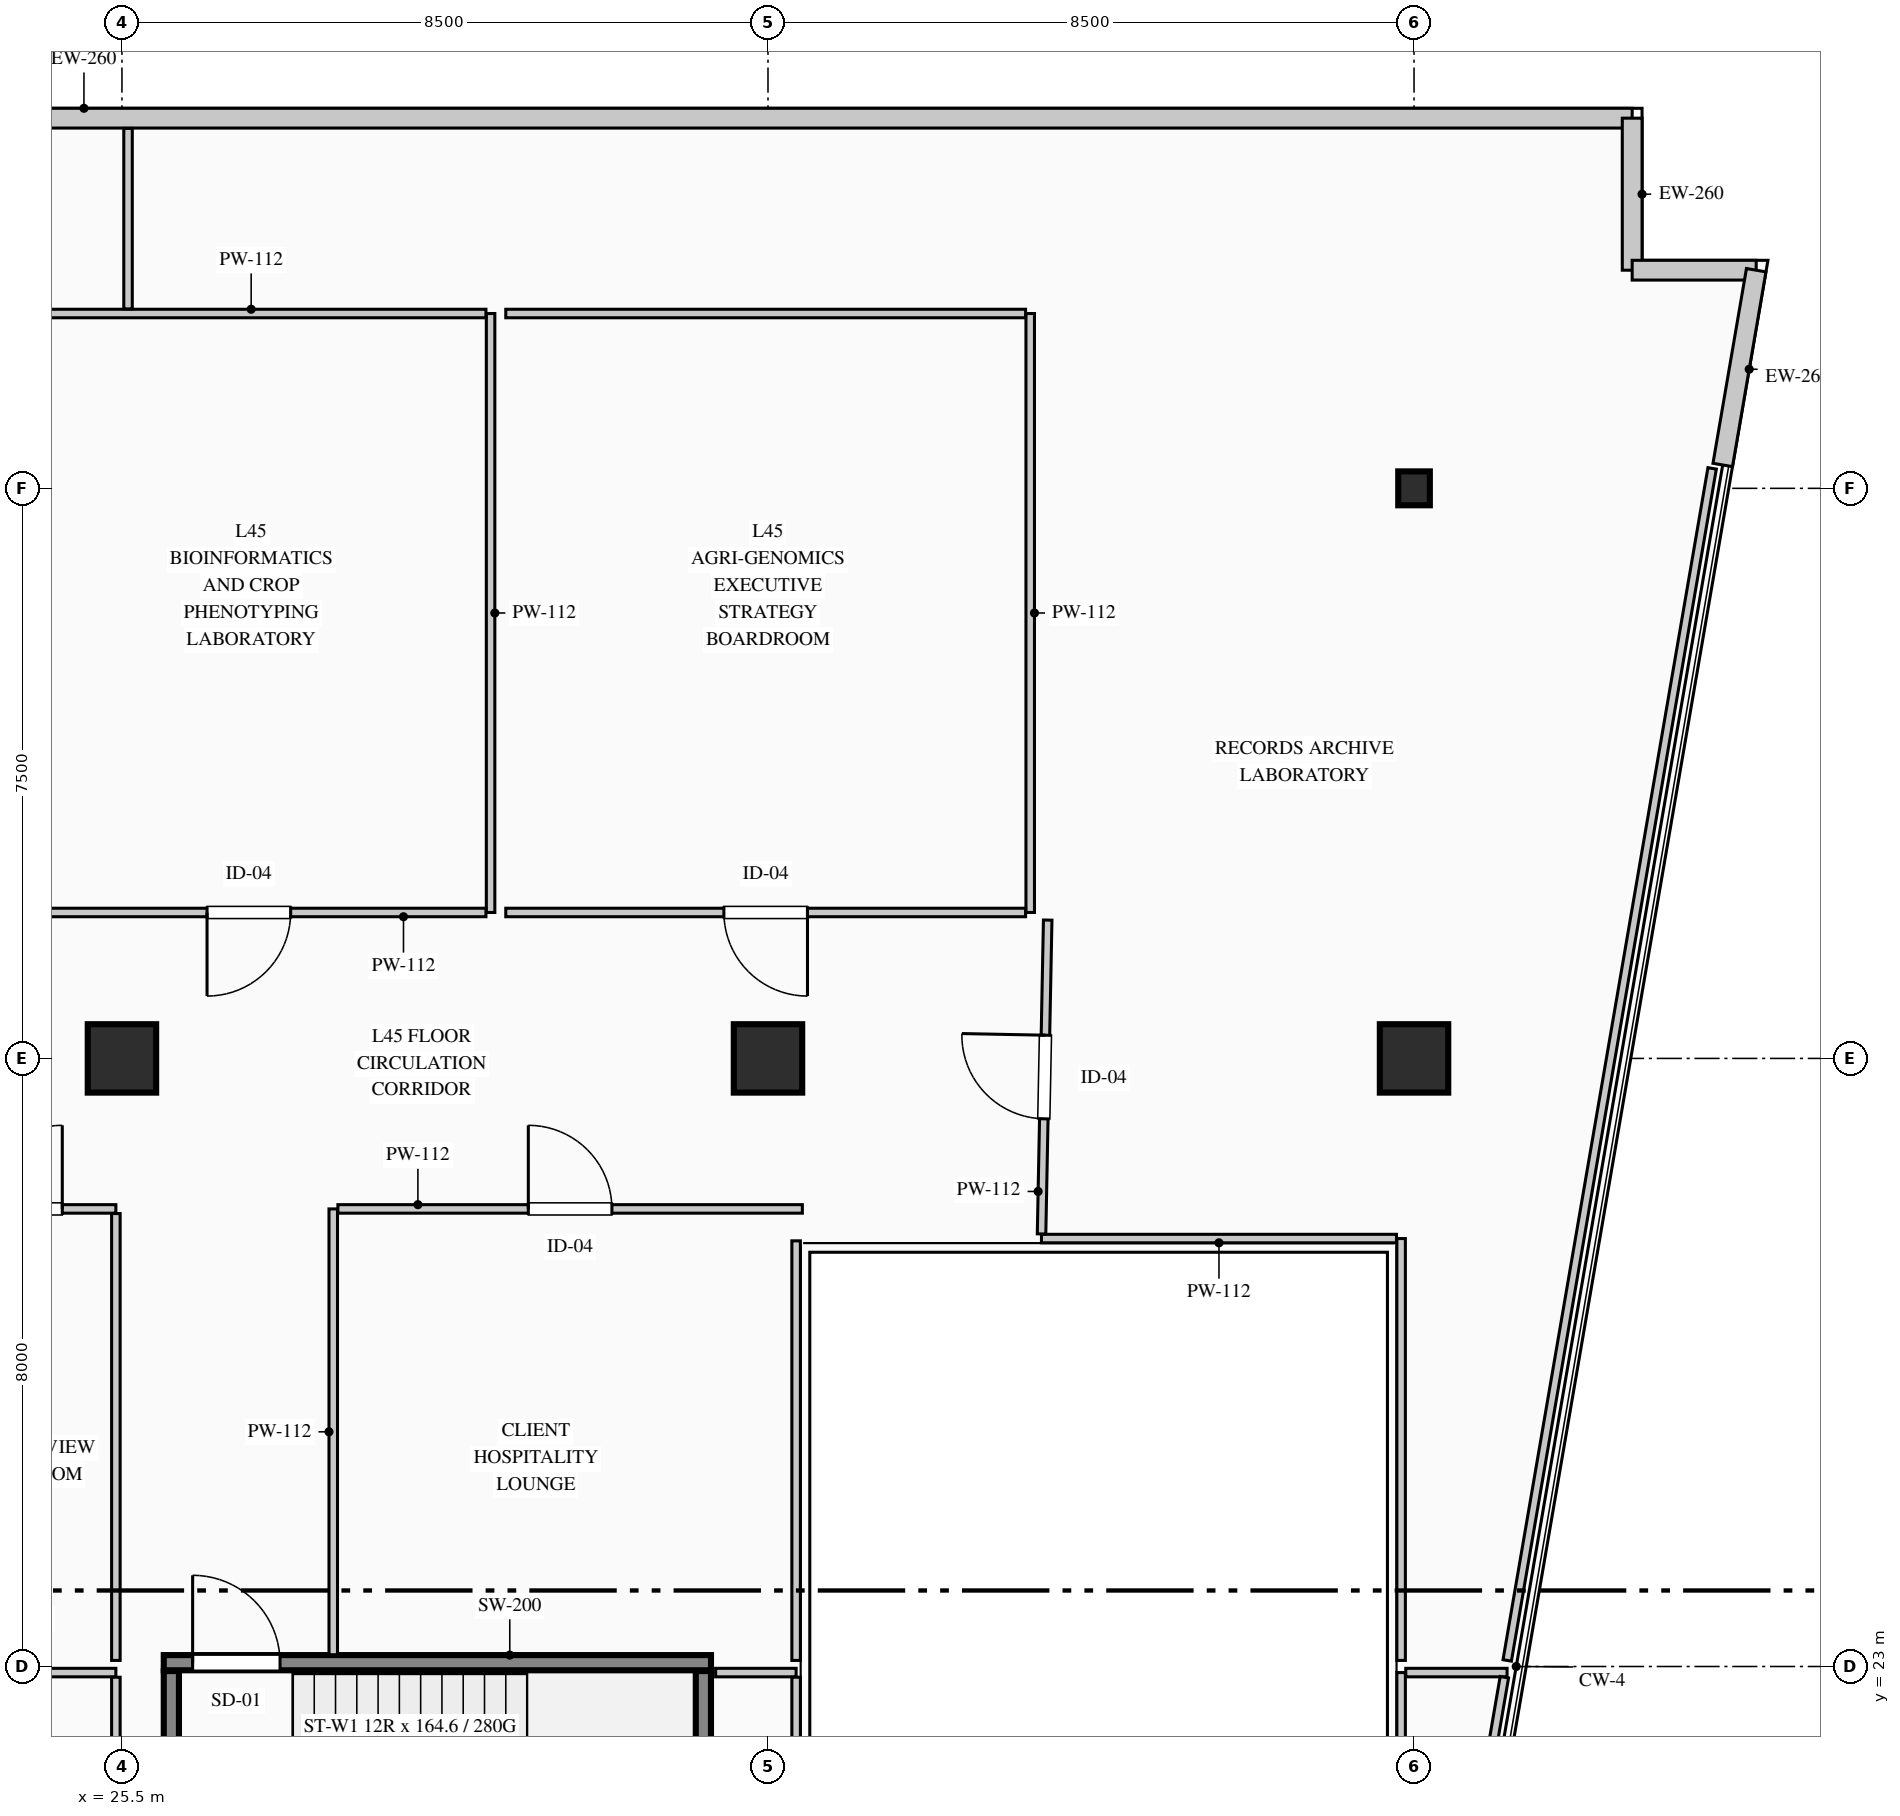
"""IFC4 building model, lengths in metres.
Left out: names, types, materials, properties, quantities, classifications, styles, units other than length and angle.
Written with IfcOpenShell. Run it as: python <this file> out.ifc"""

import sys

from ifc_helpers import new_model, si_unit, direction, frame, frame_2d, origin, origin_2d, place, context, subcontext, project, spatial, rectangle, i_section, extrude, element, fill, save


model = new_model("IFC4")
c1 = context("Model", 3, precision=1e-05, world=origin(), true_north=direction((0.0, 1.0)))
c2 = subcontext(c1, "Body", "Model", "MODEL_VIEW")
j1 = project(units=[si_unit("LENGTHUNIT", "METRE"), si_unit("PLANEANGLEUNIT", "RADIAN")], contexts=[c1])
p1 = place(None, origin())
s1 = spatial("IfcSite", under=j1, at=p1, CompositionType="ELEMENT")
p2 = place(p1, origin())
s2 = spatial("IfcBuilding", under=s1, at=p2, CompositionType="ELEMENT")
p3 = place(p2, frame((0.0, 0.0, 191.65)))
s3 = spatial("IfcBuildingStorey", under=s2, at=p3, CompositionType="ELEMENT", Elevation=191.65)
p4 = place(p3, frame((26.05, 23.05, 0.0), z_axis=(0.0, 0.0, 1.0), x_axis=(1.0, 0.0, 0.0)))
e1 = element("IfcWall", 1, at=p4, inside=s3, PredefinedType="SHEAR", context=c2, shape_type="SweptSolid", body=[
    extrude(rectangle(XDim=7.2, YDim=0.2, at=frame_2d((3.6, 0.0))), origin(), (0.0, 0.0, 1.0), 3.95),
])
p5 = place(p4, frame((0.38, 0.0, 0.0)))
e2 = element("IfcOpeningElement", 2, at=p5, cuts=e1, PredefinedType="OPENING", context=c2, shape_type="SweptSolid", body=[
    extrude(rectangle(XDim=1.15, YDim=2.2, at=frame_2d((0.575, 1.1))), frame((0.0, 0.11, 0.0), z_axis=(0.0, -1.0, 0.0), x_axis=(1.0, 0.0, 0.0)), (0.0, 0.0, 1.0), 0.22),
])
for number, where, z_axis, x_axis in (
    (3, (26.15, 19.81, 0.0), (0.0, 0.0, 1.0), (0.0, 1.0, 0.0)),
    (4, (33.15, 19.81, 0.0), (0.0, 0.0, 1.0), (0.0, 1.0, 0.0)),
):
    element("IfcWall", number, at=place(p3, frame(where, z_axis=z_axis, x_axis=x_axis)), inside=s3, PredefinedType="SHEAR", context=c2, shape_type="SweptSolid", body=[
        extrude(rectangle(XDim=3.13, YDim=0.2, at=frame_2d((1.565, 0.0))), origin(), (0.0, 0.0, 1.0), 3.95),
    ])
for number, where, z_axis, x_axis in (
    (5, (25.5, 31.0, 0.0), (0.0, 0.0, 1.0), (1.0, 0.0, 0.0)),
    (6, (34.0, 31.0, 0.0), (0.0, 0.0, 1.0), (1.0, 0.0, 0.0)),
    (7, (42.5, 31.0, 0.0), (0.0, 0.0, 1.0), (1.0, 0.0, 0.0)),
):
    element("IfcColumn", number, at=place(p3, frame(where, z_axis=z_axis, x_axis=x_axis)), inside=s3, PredefinedType="COLUMN", context=c2, shape_type="SweptSolid", body=[
        extrude(rectangle(XDim=0.9, YDim=0.9, at=origin_2d()), origin(), (0.0, 0.0, 1.0), 3.95),
    ])
p6 = place(p3, frame((42.5, 38.5, 0.0), z_axis=(0.0, 0.0, 1.0), x_axis=(1.0, 0.0, 0.0)))
e8 = element("IfcColumn", 8, at=p6, inside=s3, PredefinedType="COLUMN", context=c2, shape_type="SweptSolid", body=[
    extrude(i_section(OverallWidth=0.416, OverallDepth=0.446, WebThickness=0.039, FlangeThickness=0.063, FilletRadius=0.015, at=origin_2d()), origin(), (0.0, 0.0, 1.0), 3.95),
])
p7 = place(p3, frame((4.63, 43.37, 0.0), z_axis=(0.0, 0.0, 1.0), x_axis=(1.0, 0.0, 0.0)))
e9 = element("IfcWall", 9, at=p7, inside=s3, PredefinedType="STANDARD", context=c2, shape_type="SweptSolid", body=[
    extrude(rectangle(XDim=40.74, YDim=0.26, at=frame_2d((20.37, 0.0))), origin(), (0.0, 0.0, 1.0), 3.7),
])
p8 = place(p7, frame((13.316, 0.0, 0.9)))
e10 = element("IfcOpeningElement", 10, at=p8, cuts=e9, PredefinedType="OPENING", context=c2, shape_type="SweptSolid", body=[
    extrude(rectangle(XDim=2.7, YDim=2.1, at=frame_2d((1.35, 1.05))), frame((0.0, 0.14, 0.0), z_axis=(0.0, -1.0, 0.0), x_axis=(1.0, 0.0, 0.0)), (0.0, 0.0, 1.0), 0.28),
])
p9 = place(p3, frame((45.37, 43.37, 0.0), z_axis=(0.0, 0.0, 1.0), x_axis=(0.0, -1.0, 0.0)))
e11 = element("IfcWall", 11, at=p9, inside=s3, PredefinedType="STANDARD", context=c2, shape_type="SweptSolid", body=[
    extrude(rectangle(XDim=2.0, YDim=0.26, at=frame_2d((1.0, 0.0))), origin(), (0.0, 0.0, 1.0), 3.7),
])
p10 = place(p3, frame((45.37, 41.37, 0.0), z_axis=(0.0, 0.0, 1.0), x_axis=(1.0, 0.0, 0.0)))
e12 = element("IfcWall", 12, at=p10, inside=s3, PredefinedType="STANDARD", context=c2, shape_type="SweptSolid", body=[
    extrude(rectangle(XDim=1.632, YDim=0.26, at=frame_2d((0.816, 0.0))), origin(), (0.0, 0.0, 1.0), 3.7),
])
p11 = place(p3, frame((47.002, 41.37, 0.0), z_axis=(0.0, 0.0, 1.0), x_axis=(-0.169391215599, -0.98554889076, 0.0)))
e13 = element("IfcWall", 13, at=p11, inside=s3, PredefinedType="STANDARD", context=c2, shape_type="SweptSolid", body=[
    extrude(rectangle(XDim=2.6, YDim=0.26, at=frame_2d((1.3, 0.0))), origin(), (0.0, 0.0, 1.0), 3.7),
])
p12 = place(p3, frame((30.35, 40.8, 0.0), z_axis=(0.0, 0.0, 1.0), x_axis=(0.0, -1.0, 0.0)))
e14 = element("IfcWall", 14, at=p12, inside=s3, PredefinedType="PARTITIONING", context=c2, shape_type="SweptSolid", body=[
    extrude(rectangle(XDim=7.88, YDim=0.112, at=frame_2d((3.94, 0.0))), origin(), (0.0, 0.0, 1.0), 3.7),
])
p13 = place(p3, frame((30.289, 32.92, 0.0), z_axis=(0.0, 0.0, 1.0), x_axis=(-1.0, 0.0, 0.0)))
e15 = element("IfcWall", 15, at=p13, inside=s3, PredefinedType="PARTITIONING", context=c2, shape_type="SweptSolid", body=[
    extrude(rectangle(XDim=6.239, YDim=0.112, at=frame_2d((3.12, 0.0))), origin(), (0.0, 0.0, 1.0), 3.7),
])
p14 = place(p13, frame((2.57, 0.0, 0.0)))
e16 = element("IfcOpeningElement", 16, at=p14, cuts=e15, PredefinedType="OPENING", context=c2, shape_type="SweptSolid", body=[
    extrude(rectangle(XDim=1.1, YDim=2.2, at=frame_2d((0.55, 1.1))), frame((0.0, 0.066, 0.0), z_axis=(0.0, -1.0, 0.0), x_axis=(1.0, 0.0, 0.0)), (0.0, 0.0, 1.0), 0.132),
])
p15 = place(p3, frame((24.111, 40.8, 0.0), z_axis=(0.0, 0.0, 1.0), x_axis=(1.0, 0.0, 0.0)))
e17 = element("IfcWall", 17, at=p15, inside=s3, PredefinedType="PARTITIONING", context=c2, shape_type="SweptSolid", body=[
    extrude(rectangle(XDim=6.178, YDim=0.112, at=frame_2d((3.089, 0.0))), origin(), (0.0, 0.0, 1.0), 3.7),
])
p16 = place(p3, frame((37.45, 40.8, 0.0), z_axis=(0.0, 0.0, 1.0), x_axis=(0.0, -1.0, 0.0)))
e18 = element("IfcWall", 18, at=p16, inside=s3, PredefinedType="PARTITIONING", context=c2, shape_type="SweptSolid", body=[
    extrude(rectangle(XDim=7.88, YDim=0.112, at=frame_2d((3.94, 0.0))), origin(), (0.0, 0.0, 1.0), 3.7),
])
p17 = place(p3, frame((37.389, 32.92, 0.0), z_axis=(0.0, 0.0, 1.0), x_axis=(-1.0, 0.0, 0.0)))
e19 = element("IfcWall", 19, at=p17, inside=s3, PredefinedType="PARTITIONING", context=c2, shape_type="SweptSolid", body=[
    extrude(rectangle(XDim=6.839, YDim=0.112, at=frame_2d((3.419, 0.0))), origin(), (0.0, 0.0, 1.0), 3.7),
])
p18 = place(p17, frame((2.869, 0.0, 0.0)))
e20 = element("IfcOpeningElement", 20, at=p18, cuts=e19, PredefinedType="OPENING", context=c2, shape_type="SweptSolid", body=[
    extrude(rectangle(XDim=1.1, YDim=2.2, at=frame_2d((0.55, 1.1))), frame((0.0, 0.066, 0.0), z_axis=(0.0, -1.0, 0.0), x_axis=(1.0, 0.0, 0.0)), (0.0, 0.0, 1.0), 0.132),
])
p19 = place(p3, frame((30.55, 40.8, 0.0), z_axis=(0.0, 0.0, 1.0), x_axis=(1.0, 0.0, 0.0)))
e21 = element("IfcWall", 21, at=p19, inside=s3, PredefinedType="PARTITIONING", context=c2, shape_type="SweptSolid", body=[
    extrude(rectangle(XDim=6.839, YDim=0.112, at=frame_2d((3.419, 0.0))), origin(), (0.0, 0.0, 1.0), 3.7),
])
p20 = place(p3, frame((33.311, 22.92, 0.0), z_axis=(0.0, 0.0, 1.0), x_axis=(1.0, 0.0, 0.0)))
e22 = element("IfcWall", 22, at=p20, inside=s3, PredefinedType="PARTITIONING", context=c2, shape_type="SweptSolid", body=[
    extrude(rectangle(XDim=1.059, YDim=0.112, at=frame_2d((0.53, 0.0))), origin(), (0.0, 0.0, 1.0), 3.7),
])
p21 = place(p3, frame((34.37, 22.859, 0.0), z_axis=(0.0, 0.0, 1.0), x_axis=(0.0, -1.0, 0.0)))
e23 = element("IfcWall", 23, at=p21, inside=s3, PredefinedType="PARTITIONING", context=c2, shape_type="SweptSolid", body=[
    extrude(rectangle(XDim=3.239, YDim=0.112, at=frame_2d((1.619, 0.0))), origin(), (0.0, 0.0, 1.0), 3.7),
])
p22 = place(p3, frame((42.33, 19.681, 0.0), z_axis=(0.0, 0.0, 1.0), x_axis=(0.0, 1.0, 0.0)))
e24 = element("IfcWall", 24, at=p22, inside=s3, PredefinedType="PARTITIONING", context=c2, shape_type="SweptSolid", body=[
    extrude(rectangle(XDim=3.239, YDim=0.112, at=frame_2d((1.62, 0.0))), origin(), (0.0, 0.0, 1.0), 3.7),
])
p23 = place(p3, frame((42.391, 22.92, 0.0), z_axis=(0.0, 0.0, 1.0), x_axis=(1.0, 0.0, 0.0)))
e25 = element("IfcWall", 25, at=p23, inside=s3, PredefinedType="PARTITIONING", context=c2, shape_type="SweptSolid", body=[
    extrude(rectangle(XDim=1.333, YDim=0.112, at=frame_2d((0.667, 0.0))), origin(), (0.0, 0.0, 1.0), 3.7),
])
p24 = place(p3, frame((43.688, 22.859, 0.0), z_axis=(0.0, 0.0, 1.0), x_axis=(-0.169369383288, -0.985552642939, 0.0)))
e26 = element("IfcWall", 26, at=p24, inside=s3, PredefinedType="PARTITIONING", context=c2, shape_type="SweptSolid", body=[
    extrude(rectangle(XDim=3.225, YDim=0.112, at=frame_2d((1.612, 0.0))), origin(), (0.0, 0.0, 1.0), 3.7),
])
p25 = place(p3, frame((22.91, 22.92, 0.0), z_axis=(0.0, 0.0, 1.0), x_axis=(1.0, 0.0, 0.0)))
e27 = element("IfcWall", 27, at=p25, inside=s3, PredefinedType="PARTITIONING", context=c2, shape_type="SweptSolid", body=[
    extrude(rectangle(XDim=2.51, YDim=0.112, at=frame_2d((1.255, 0.0))), origin(), (0.0, 0.0, 1.0), 3.7),
])
p26 = place(p3, frame((25.42, 22.859, 0.0), z_axis=(0.0, 0.0, 1.0), x_axis=(0.0, -1.0, 0.0)))
e28 = element("IfcWall", 28, at=p26, inside=s3, PredefinedType="PARTITIONING", context=c2, shape_type="SweptSolid", body=[
    extrude(rectangle(XDim=7.611, YDim=0.112, at=frame_2d((3.805, 0.0))), origin(), (0.0, 0.0, 1.0), 2.885),
])
p27 = place(p3, frame((22.91, 29.02, 0.0), z_axis=(0.0, 0.0, 1.0), x_axis=(1.0, 0.0, 0.0)))
e29 = element("IfcWall", 29, at=p27, inside=s3, PredefinedType="PARTITIONING", context=c2, shape_type="SweptSolid", body=[
    extrude(rectangle(XDim=2.51, YDim=0.112, at=frame_2d((1.255, 0.0))), origin(), (0.0, 0.0, 1.0), 3.7),
])
p28 = place(p27, frame((0.705, 0.0, 0.0)))
e30 = element("IfcOpeningElement", 30, at=p28, cuts=e29, PredefinedType="OPENING", context=c2, shape_type="SweptSolid", body=[
    extrude(rectangle(XDim=1.1, YDim=2.2, at=frame_2d((0.55, 1.1))), frame((0.0, 0.066, 0.0), z_axis=(0.0, -1.0, 0.0), x_axis=(1.0, 0.0, 0.0)), (0.0, 0.0, 1.0), 0.132),
])
p29 = place(p3, frame((25.42, 28.959, 0.0), z_axis=(0.0, 0.0, 1.0), x_axis=(0.0, -1.0, 0.0)))
e31 = element("IfcWall", 31, at=p29, inside=s3, PredefinedType="PARTITIONING", context=c2, shape_type="SweptSolid", body=[
    extrude(rectangle(XDim=5.879, YDim=0.112, at=frame_2d((2.939, 0.0))), origin(), (0.0, 0.0, 1.0), 2.885),
])
p30 = place(p3, frame((34.37, 28.6, 0.0), z_axis=(0.0, 0.0, 1.0), x_axis=(0.0, -1.0, 0.0)))
e32 = element("IfcWall", 32, at=p30, inside=s3, PredefinedType="PARTITIONING", context=c2, shape_type="SweptSolid", body=[
    extrude(rectangle(XDim=5.52, YDim=0.112, at=frame_2d((2.76, 0.0))), origin(), (0.0, 0.0, 1.0), 3.7),
])
p31 = place(p3, frame((28.28, 23.155, 0.0), z_axis=(0.0, 0.0, 1.0), x_axis=(0.0, 1.0, 0.0)))
e33 = element("IfcWall", 33, at=p31, inside=s3, PredefinedType="PARTITIONING", context=c2, shape_type="SweptSolid", body=[
    extrude(rectangle(XDim=5.865, YDim=0.112, at=frame_2d((2.933, 0.0))), origin(), (0.0, 0.0, 1.0), 3.7),
])
p32 = place(p3, frame((28.341, 29.02, 0.0), z_axis=(0.0, 0.0, 1.0), x_axis=(1.0, 0.0, 0.0)))
e34 = element("IfcWall", 34, at=p32, inside=s3, PredefinedType="PARTITIONING", context=c2, shape_type="SweptSolid", body=[
    extrude(rectangle(XDim=6.111, YDim=0.112, at=frame_2d((3.055, 0.0))), origin(), (0.0, 0.0, 1.0), 3.385),
])
p33 = place(p32, frame((2.506, 0.0, 0.0)))
e35 = element("IfcOpeningElement", 35, at=p33, cuts=e34, PredefinedType="OPENING", context=c2, shape_type="SweptSolid", body=[
    extrude(rectangle(XDim=1.1, YDim=2.2, at=frame_2d((0.55, 1.1))), frame((0.0, 0.066, 0.0), z_axis=(0.0, -1.0, 0.0), x_axis=(1.0, 0.0, 0.0)), (0.0, 0.0, 1.0), 0.132),
])
p34 = place(p3, frame((46.422, 38.763, 0.0), z_axis=(0.0, 0.0, 1.0), x_axis=(-0.169427539839, -0.985542646842, 0.0)))
e36 = element("IfcWall", 36, at=p34, inside=s3, PredefinedType="PARTITIONING", context=c2, shape_type="SweptSolid", body=[
    extrude(rectangle(XDim=15.913, YDim=0.112, at=frame_2d((7.956, 0.0))), origin(), (0.0, 0.0, 1.0), 3.7),
])
p35 = place(p3, frame((42.33, 23.08, 0.0), z_axis=(0.0, 0.0, 1.0), x_axis=(0.0, 1.0, 0.0)))
e37 = element("IfcWall", 37, at=p35, inside=s3, PredefinedType="PARTITIONING", context=c2, shape_type="SweptSolid", body=[
    extrude(rectangle(XDim=5.55, YDim=0.112, at=frame_2d((2.775, 0.0))), origin(), (0.0, 0.0, 1.0), 3.7),
])
p36 = place(p3, frame((42.269, 28.63, 0.0), z_axis=(0.0, 0.0, 1.0), x_axis=(-1.0, 0.0, 0.0)))
e38 = element("IfcWall", 38, at=p36, inside=s3, PredefinedType="PARTITIONING", context=c2, shape_type="SweptSolid", body=[
    extrude(rectangle(XDim=4.671, YDim=0.112, at=frame_2d((2.335, 0.0))), origin(), (0.0, 0.0, 1.0), 3.7),
])
p37 = place(p3, frame((37.599, 28.691, 0.0), z_axis=(0.0, 0.0, 1.0), x_axis=(0.019566997539, 0.999808547977, 0.0)))
e39 = element("IfcWall", 39, at=p37, inside=s3, PredefinedType="PARTITIONING", context=c2, shape_type="SweptSolid", body=[
    extrude(rectangle(XDim=4.13, YDim=0.112, at=frame_2d((2.065, 0.0))), origin(), (0.0, 0.0, 1.0), 3.7),
])
p38 = place(p37, frame((1.515, 0.0, 0.0)))
e40 = element("IfcOpeningElement", 40, at=p38, cuts=e39, PredefinedType="OPENING", context=c2, shape_type="SweptSolid", body=[
    extrude(rectangle(XDim=1.1, YDim=2.2, at=frame_2d((0.55, 1.1))), frame((0.0, 0.066, 0.0), z_axis=(0.0, -1.0, 0.0), x_axis=(1.0, 0.0, 0.0)), (0.0, 0.0, 1.0), 0.132),
])
p39 = place(p3, frame((25.58, 40.861, 0.0), z_axis=(0.0, 0.0, 1.0), x_axis=(0.0, 1.0, 0.0)))
e41 = element("IfcWall", 41, at=p39, inside=s3, PredefinedType="PARTITIONING", context=c2, shape_type="SweptSolid", body=[
    extrude(rectangle(XDim=2.374, YDim=0.112, at=frame_2d((1.187, 0.0))), origin(), (0.0, 0.0, 1.0), 3.7),
])
p40 = place(p5, origin())
e42 = element("IfcDoor", 42, at=p40, inside=s3, OperationType="SINGLE_SWING_LEFT", PredefinedType="DOOR", context=c2, shape_type="SweptSolid", body=[
    extrude(rectangle(XDim=1.15, YDim=2.2, at=frame_2d((0.575, 1.1))), frame((0.0, 0.025, 0.0), z_axis=(0.0, -1.0, 0.0), x_axis=(1.0, 0.0, 0.0)), (0.0, 0.0, 1.0), 0.05),
])
fill(e2, e42)
p41 = place(p14, origin())
e43 = element("IfcDoor", 43, at=p41, inside=s3, OperationType="SINGLE_SWING_RIGHT", PredefinedType="DOOR", context=c2, shape_type="SweptSolid", body=[
    extrude(rectangle(XDim=1.1, YDim=2.2, at=frame_2d((0.55, 1.1))), frame((0.0, 0.025, 0.0), z_axis=(0.0, -1.0, 0.0), x_axis=(1.0, 0.0, 0.0)), (0.0, 0.0, 1.0), 0.05),
])
fill(e16, e43)
p42 = place(p18, origin())
e44 = element("IfcDoor", 44, at=p42, inside=s3, OperationType="SINGLE_SWING_LEFT", PredefinedType="DOOR", context=c2, shape_type="SweptSolid", body=[
    extrude(rectangle(XDim=1.1, YDim=2.2, at=frame_2d((0.55, 1.1))), frame((0.0, 0.025, 0.0), z_axis=(0.0, -1.0, 0.0), x_axis=(1.0, 0.0, 0.0)), (0.0, 0.0, 1.0), 0.05),
])
fill(e20, e44)
p43 = place(p28, origin())
e45 = element("IfcDoor", 45, at=p43, inside=s3, OperationType="SINGLE_SWING_RIGHT", PredefinedType="DOOR", context=c2, shape_type="SweptSolid", body=[
    extrude(rectangle(XDim=1.1, YDim=2.2, at=frame_2d((0.55, 1.1))), frame((0.0, 0.025, 0.0), z_axis=(0.0, -1.0, 0.0), x_axis=(1.0, 0.0, 0.0)), (0.0, 0.0, 1.0), 0.05),
])
fill(e30, e45)
p44 = place(p33, origin())
e46 = element("IfcDoor", 46, at=p44, inside=s3, OperationType="SINGLE_SWING_LEFT", PredefinedType="DOOR", context=c2, shape_type="SweptSolid", body=[
    extrude(rectangle(XDim=1.1, YDim=2.2, at=frame_2d((0.55, 1.1))), frame((0.0, 0.025, 0.0), z_axis=(0.0, -1.0, 0.0), x_axis=(1.0, 0.0, 0.0)), (0.0, 0.0, 1.0), 0.05),
])
fill(e35, e46)
p45 = place(p38, origin())
e47 = element("IfcDoor", 47, at=p45, inside=s3, OperationType="SINGLE_SWING_RIGHT", PredefinedType="DOOR", context=c2, shape_type="SweptSolid", body=[
    extrude(rectangle(XDim=1.1, YDim=2.2, at=frame_2d((0.55, 1.1))), frame((0.0, 0.025, 0.0), z_axis=(0.0, -1.0, 0.0), x_axis=(1.0, 0.0, 0.0)), (0.0, 0.0, 1.0), 0.05),
])
fill(e40, e47)
save(model, sys.argv[1])
